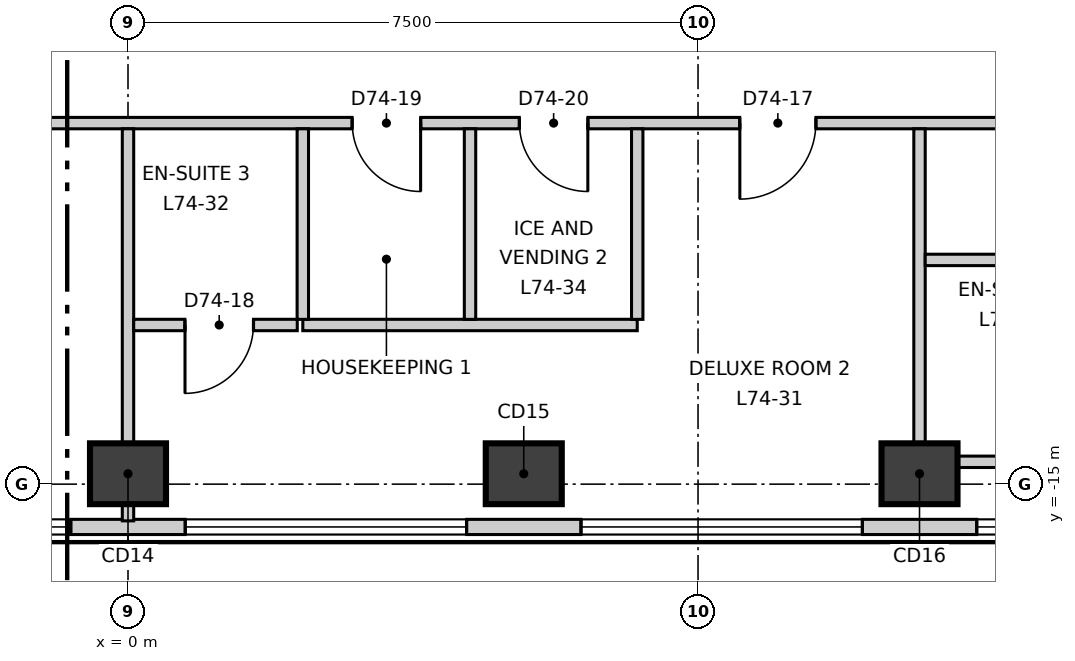
"""IFC4 building model, lengths in metres.
Left out: names, types, materials, properties, quantities, classifications, styles, units other than length and angle.
Written with IfcOpenShell. Run it as: python <this file> out.ifc"""

import sys

from ifc_helpers import new_model, si_unit, direction, frame, frame_2d, origin, origin_2d, place, context, subcontext, project, spatial, rectangle, extrude, element, fill, save


model = new_model("IFC4")
c1 = context("Model", 3, precision=1e-05, world=origin(), true_north=direction((0.0, 1.0)))
c2 = subcontext(c1, "Body", "Model", "MODEL_VIEW")
j1 = project(units=[si_unit("LENGTHUNIT", "METRE"), si_unit("PLANEANGLEUNIT", "RADIAN")], contexts=[c1])
p1 = place(None, origin())
s1 = spatial("IfcSite", under=j1, at=p1, CompositionType="ELEMENT")
p2 = place(p1, origin())
s2 = spatial("IfcBuilding", under=s1, at=p2, CompositionType="ELEMENT")
p3 = place(p2, frame((0.0, 0.0, 311.5)))
s3 = spatial("IfcBuildingStorey", under=s2, at=p3, CompositionType="ELEMENT", Elevation=311.5)
for number, where, z_axis, x_axis in (
    (1, (0.0, -14.863, -0.3), (0.0, 0.0, 1.0), (1.0, 0.0, 0.0)),
    (2, (5.207, -14.863, -0.3), (0.0, 0.0, 1.0), (1.0, 0.0, 0.0)),
    (3, (10.414, -14.863, -0.3), (0.0, 0.0, 1.0), (1.0, 0.0, 0.0)),
):
    element("IfcColumn", number, at=place(p3, frame(where, z_axis=z_axis, x_axis=x_axis)), inside=s3, PredefinedType="COLUMN", context=c2, shape_type="SweptSolid", body=[
        extrude(rectangle(XDim=1.0, YDim=0.8, at=origin_2d()), origin(), (0.0, 0.0, 1.0), 3.6),
    ])
p4 = place(p3, frame((-22.132, -15.563, 0.0), z_axis=(0.0, 0.0, 1.0), x_axis=(1.0, 0.0, 0.0)))
e4 = element("IfcWall", 4, at=p4, inside=s3, PredefinedType="ELEMENTEDWALL", context=c2, shape_type="SweptSolid", body=[
    extrude(rectangle(XDim=44.244, YDim=0.2, at=frame_2d((22.122, 0.0))), origin(), (0.0, 0.0, 1.0), 3.3),
])
p5 = place(p4, frame((2.057, 0.0, 0.9)))
e5 = element("IfcOpeningElement", 5, at=p5, cuts=e4, PredefinedType="OPENING", context=c2, shape_type="SweptSolid", body=[
    extrude(rectangle(XDim=3.7, YDim=2.2, at=frame_2d((1.85, 1.1))), frame((0.0, 0.11, 0.0), z_axis=(0.0, -1.0, 0.0), x_axis=(1.0, 0.0, 0.0)), (0.0, 0.0, 1.0), 0.22),
])
p6 = place(p4, frame((7.264, 0.0, 0.9)))
e6 = element("IfcOpeningElement", 6, at=p6, cuts=e4, PredefinedType="OPENING", context=c2, shape_type="SweptSolid", body=[
    extrude(rectangle(XDim=3.7, YDim=2.2, at=frame_2d((1.85, 1.1))), frame((0.0, 0.11, 0.0), z_axis=(0.0, -1.0, 0.0), x_axis=(1.0, 0.0, 0.0)), (0.0, 0.0, 1.0), 0.22),
])
p7 = place(p4, frame((12.471, 0.0, 0.9)))
e7 = element("IfcOpeningElement", 7, at=p7, cuts=e4, PredefinedType="OPENING", context=c2, shape_type="SweptSolid", body=[
    extrude(rectangle(XDim=3.7, YDim=2.2, at=frame_2d((1.85, 1.1))), frame((0.0, 0.11, 0.0), z_axis=(0.0, -1.0, 0.0), x_axis=(1.0, 0.0, 0.0)), (0.0, 0.0, 1.0), 0.22),
])
p8 = place(p4, frame((17.678, 0.0, 0.9)))
e8 = element("IfcOpeningElement", 8, at=p8, cuts=e4, PredefinedType="OPENING", context=c2, shape_type="SweptSolid", body=[
    extrude(rectangle(XDim=3.7, YDim=2.2, at=frame_2d((1.85, 1.1))), frame((0.0, 0.11, 0.0), z_axis=(0.0, -1.0, 0.0), x_axis=(1.0, 0.0, 0.0)), (0.0, 0.0, 1.0), 0.22),
])
p9 = place(p4, frame((22.886, 0.0, 0.9)))
e9 = element("IfcOpeningElement", 9, at=p9, cuts=e4, PredefinedType="OPENING", context=c2, shape_type="SweptSolid", body=[
    extrude(rectangle(XDim=3.7, YDim=2.2, at=frame_2d((1.85, 1.1))), frame((0.0, 0.11, 0.0), z_axis=(0.0, -1.0, 0.0), x_axis=(1.0, 0.0, 0.0)), (0.0, 0.0, 1.0), 0.22),
])
p10 = place(p4, frame((28.093, 0.0, 0.9)))
e10 = element("IfcOpeningElement", 10, at=p10, cuts=e4, PredefinedType="OPENING", context=c2, shape_type="SweptSolid", body=[
    extrude(rectangle(XDim=3.7, YDim=2.2, at=frame_2d((1.85, 1.1))), frame((0.0, 0.11, 0.0), z_axis=(0.0, -1.0, 0.0), x_axis=(1.0, 0.0, 0.0)), (0.0, 0.0, 1.0), 0.22),
])
p11 = place(p4, frame((33.3, 0.0, 0.9)))
e11 = element("IfcOpeningElement", 11, at=p11, cuts=e4, PredefinedType="OPENING", context=c2, shape_type="SweptSolid", body=[
    extrude(rectangle(XDim=3.7, YDim=2.2, at=frame_2d((1.85, 1.1))), frame((0.0, 0.11, 0.0), z_axis=(0.0, -1.0, 0.0), x_axis=(1.0, 0.0, 0.0)), (0.0, 0.0, 1.0), 0.22),
])
p12 = place(p4, frame((38.507, 0.0, 0.9)))
e12 = element("IfcOpeningElement", 12, at=p12, cuts=e4, PredefinedType="OPENING", context=c2, shape_type="SweptSolid", body=[
    extrude(rectangle(XDim=3.7, YDim=2.2, at=frame_2d((1.85, 1.1))), frame((0.0, 0.11, 0.0), z_axis=(0.0, -1.0, 0.0), x_axis=(1.0, 0.0, 0.0)), (0.0, 0.0, 1.0), 0.22),
])
p13 = place(p3, frame((24.544, -11.385, 0.0), z_axis=(0.0, 0.0, 1.0), x_axis=(-0.500002044679, 0.866024223285, 0.0)))
e13 = element("IfcWall", 13, at=p13, inside=s3, PredefinedType="ELEMENTEDWALL", context=c2, shape_type="SweptSolid", body=[
    extrude(rectangle(XDim=44.243, YDim=0.2, at=frame_2d((22.122, 0.0))), origin(), (0.0, 0.0, 1.0), 3.3),
])
p14 = place(p13, frame((2.056, 0.0, 0.9)))
e14 = element("IfcOpeningElement", 14, at=p14, cuts=e13, PredefinedType="OPENING", context=c2, shape_type="SweptSolid", body=[
    extrude(rectangle(XDim=3.7, YDim=2.2, at=frame_2d((1.85, 1.1))), frame((0.0, 0.11, 0.0), z_axis=(0.0, -1.0, 0.0), x_axis=(1.0, 0.0, 0.0)), (0.0, 0.0, 1.0), 0.22),
])
p15 = place(p13, frame((7.264, 0.0, 0.9)))
e15 = element("IfcOpeningElement", 15, at=p15, cuts=e13, PredefinedType="OPENING", context=c2, shape_type="SweptSolid", body=[
    extrude(rectangle(XDim=3.7, YDim=2.2, at=frame_2d((1.85, 1.1))), frame((0.0, 0.11, 0.0), z_axis=(0.0, -1.0, 0.0), x_axis=(1.0, 0.0, 0.0)), (0.0, 0.0, 1.0), 0.22),
])
p16 = place(p13, frame((12.471, 0.0, 0.9)))
e16 = element("IfcOpeningElement", 16, at=p16, cuts=e13, PredefinedType="OPENING", context=c2, shape_type="SweptSolid", body=[
    extrude(rectangle(XDim=3.7, YDim=2.2, at=frame_2d((1.85, 1.1))), frame((0.0, 0.11, 0.0), z_axis=(0.0, -1.0, 0.0), x_axis=(1.0, 0.0, 0.0)), (0.0, 0.0, 1.0), 0.22),
])
p17 = place(p13, frame((17.678, 0.0, 0.9)))
e17 = element("IfcOpeningElement", 17, at=p17, cuts=e13, PredefinedType="OPENING", context=c2, shape_type="SweptSolid", body=[
    extrude(rectangle(XDim=3.7, YDim=2.2, at=frame_2d((1.85, 1.1))), frame((0.0, 0.11, 0.0), z_axis=(0.0, -1.0, 0.0), x_axis=(1.0, 0.0, 0.0)), (0.0, 0.0, 1.0), 0.22),
])
p18 = place(p13, frame((22.885, 0.0, 0.9)))
e18 = element("IfcOpeningElement", 18, at=p18, cuts=e13, PredefinedType="OPENING", context=c2, shape_type="SweptSolid", body=[
    extrude(rectangle(XDim=3.7, YDim=2.2, at=frame_2d((1.85, 1.1))), frame((0.0, 0.11, 0.0), z_axis=(0.0, -1.0, 0.0), x_axis=(1.0, 0.0, 0.0)), (0.0, 0.0, 1.0), 0.22),
])
p19 = place(p13, frame((28.093, 0.0, 0.9)))
e19 = element("IfcOpeningElement", 19, at=p19, cuts=e13, PredefinedType="OPENING", context=c2, shape_type="SweptSolid", body=[
    extrude(rectangle(XDim=3.7, YDim=2.2, at=frame_2d((1.85, 1.1))), frame((0.0, 0.11, 0.0), z_axis=(0.0, -1.0, 0.0), x_axis=(1.0, 0.0, 0.0)), (0.0, 0.0, 1.0), 0.22),
])
p20 = place(p13, frame((33.3, 0.0, 0.9)))
e20 = element("IfcOpeningElement", 20, at=p20, cuts=e13, PredefinedType="OPENING", context=c2, shape_type="SweptSolid", body=[
    extrude(rectangle(XDim=3.7, YDim=2.2, at=frame_2d((1.85, 1.1))), frame((0.0, 0.11, 0.0), z_axis=(0.0, -1.0, 0.0), x_axis=(1.0, 0.0, 0.0)), (0.0, 0.0, 1.0), 0.22),
])
p21 = place(p13, frame((38.507, 0.0, 0.9)))
e21 = element("IfcOpeningElement", 21, at=p21, cuts=e13, PredefinedType="OPENING", context=c2, shape_type="SweptSolid", body=[
    extrude(rectangle(XDim=3.7, YDim=2.2, at=frame_2d((1.85, 1.1))), frame((0.0, 0.11, 0.0), z_axis=(0.0, -1.0, 0.0), x_axis=(1.0, 0.0, 0.0)), (0.0, 0.0, 1.0), 0.22),
])
p22 = place(p3, frame((-17.678, -10.12, 0.0), z_axis=(0.0, 0.0, 1.0), x_axis=(0.49998824015, 0.86603219323, 0.0)))
e22 = element("IfcWall", 22, at=p22, inside=s3, PredefinedType="PARTITIONING", context=c2, shape_type="SweptSolid", body=[
    extrude(rectangle(XDim=35.357, YDim=0.15, at=frame_2d((17.678, 0.0))), origin(), (0.0, 0.0, 1.0), 3.3),
])
p23 = place(p22, frame((28.607, 0.0, 0.0)))
e23 = element("IfcOpeningElement", 23, at=p23, cuts=e22, PredefinedType="OPENING", context=c2, shape_type="SweptSolid", body=[
    extrude(rectangle(XDim=1.0, YDim=2.1, at=frame_2d((0.5, 1.05))), frame((0.0, 0.085, 0.0), z_axis=(0.0, -1.0, 0.0), x_axis=(1.0, 0.0, 0.0)), (0.0, 0.0, 1.0), 0.17),
])
p24 = place(p22, frame((13.86, 0.0, 0.0)))
e24 = element("IfcOpeningElement", 24, at=p24, cuts=e22, PredefinedType="OPENING", context=c2, shape_type="SweptSolid", body=[
    extrude(rectangle(XDim=1.0, YDim=2.1, at=frame_2d((0.5, 1.05))), frame((0.0, 0.085, 0.0), z_axis=(0.0, -1.0, 0.0), x_axis=(1.0, 0.0, 0.0)), (0.0, 0.0, 1.0), 0.17),
])
p25 = place(p22, frame((18.96, 0.0, 0.0)))
e25 = element("IfcOpeningElement", 25, at=p25, cuts=e22, PredefinedType="OPENING", context=c2, shape_type="SweptSolid", body=[
    extrude(rectangle(XDim=0.9, YDim=2.1, at=frame_2d((0.45, 1.05))), frame((0.0, 0.085, 0.0), z_axis=(0.0, -1.0, 0.0), x_axis=(1.0, 0.0, 0.0)), (0.0, 0.0, 1.0), 0.17),
])
p26 = place(p22, frame((16.86, 0.0, 0.0)))
e26 = element("IfcOpeningElement", 26, at=p26, cuts=e22, PredefinedType="OPENING", context=c2, shape_type="SweptSolid", body=[
    extrude(rectangle(XDim=0.9, YDim=2.1, at=frame_2d((0.45, 1.05))), frame((0.0, 0.085, 0.0), z_axis=(0.0, -1.0, 0.0), x_axis=(1.0, 0.0, 0.0)), (0.0, 0.0, 1.0), 0.17),
])
p27 = place(p22, frame((8.146, 0.0, 0.0)))
e27 = element("IfcOpeningElement", 27, at=p27, cuts=e22, PredefinedType="OPENING", context=c2, shape_type="SweptSolid", body=[
    extrude(rectangle(XDim=1.0, YDim=2.1, at=frame_2d((0.5, 1.05))), frame((0.0, 0.085, 0.0), z_axis=(0.0, -1.0, 0.0), x_axis=(1.0, 0.0, 0.0)), (0.0, 0.0, 1.0), 0.17),
])
p28 = place(p22, frame((3.038, 0.0, 0.0)))
e28 = element("IfcOpeningElement", 28, at=p28, cuts=e22, PredefinedType="OPENING", context=c2, shape_type="SweptSolid", body=[
    extrude(rectangle(XDim=1.0, YDim=2.1, at=frame_2d((0.5, 1.05))), frame((0.0, 0.085, 0.0), z_axis=(0.0, -1.0, 0.0), x_axis=(1.0, 0.0, 0.0)), (0.0, 0.0, 1.0), 0.17),
])
p29 = place(p3, frame((-17.604, -10.25, 0.0), z_axis=(0.0, 0.0, 1.0), x_axis=(1.0, 0.0, 0.0)))
e29 = element("IfcWall", 29, at=p29, inside=s3, PredefinedType="PARTITIONING", context=c2, shape_type="SweptSolid", body=[
    extrude(rectangle(XDim=35.358, YDim=0.15, at=frame_2d((17.679, 0.0))), origin(), (0.0, 0.0, 1.0), 3.3),
])
p30 = place(p29, frame((3.0, 0.0, 0.0)))
e30 = element("IfcOpeningElement", 30, at=p30, cuts=e29, PredefinedType="OPENING", context=c2, shape_type="SweptSolid", body=[
    extrude(rectangle(XDim=1.0, YDim=2.1, at=frame_2d((0.5, 1.05))), frame((0.0, 0.085, 0.0), z_axis=(0.0, -1.0, 0.0), x_axis=(1.0, 0.0, 0.0)), (0.0, 0.0, 1.0), 0.17),
])
p31 = place(p29, frame((15.14, 0.0, 0.0)))
e31 = element("IfcOpeningElement", 31, at=p31, cuts=e29, PredefinedType="OPENING", context=c2, shape_type="SweptSolid", body=[
    extrude(rectangle(XDim=1.0, YDim=2.1, at=frame_2d((0.5, 1.05))), frame((0.0, 0.085, 0.0), z_axis=(0.0, -1.0, 0.0), x_axis=(1.0, 0.0, 0.0)), (0.0, 0.0, 1.0), 0.17),
])
p32 = place(p29, frame((10.14, 0.0, 0.0)))
e32 = element("IfcOpeningElement", 32, at=p32, cuts=e29, PredefinedType="OPENING", context=c2, shape_type="SweptSolid", body=[
    extrude(rectangle(XDim=0.9, YDim=2.1, at=frame_2d((0.45, 1.05))), frame((0.0, 0.085, 0.0), z_axis=(0.0, -1.0, 0.0), x_axis=(1.0, 0.0, 0.0)), (0.0, 0.0, 1.0), 0.17),
])
p33 = place(p29, frame((12.24, 0.0, 0.0)))
e33 = element("IfcOpeningElement", 33, at=p33, cuts=e29, PredefinedType="OPENING", context=c2, shape_type="SweptSolid", body=[
    extrude(rectangle(XDim=0.9, YDim=2.1, at=frame_2d((0.45, 1.05))), frame((0.0, 0.085, 0.0), z_axis=(0.0, -1.0, 0.0), x_axis=(1.0, 0.0, 0.0)), (0.0, 0.0, 1.0), 0.17),
])
p34 = place(p29, frame((25.654, 0.0, 0.0)))
e34 = element("IfcOpeningElement", 34, at=p34, cuts=e29, PredefinedType="OPENING", context=c2, shape_type="SweptSolid", body=[
    extrude(rectangle(XDim=1.0, YDim=2.1, at=frame_2d((0.5, 1.05))), frame((0.0, 0.085, 0.0), z_axis=(0.0, -1.0, 0.0), x_axis=(1.0, 0.0, 0.0)), (0.0, 0.0, 1.0), 0.17),
])
p35 = place(p29, frame((20.554, 0.0, 0.0)))
e35 = element("IfcOpeningElement", 35, at=p35, cuts=e29, PredefinedType="OPENING", context=c2, shape_type="SweptSolid", body=[
    extrude(rectangle(XDim=0.9, YDim=2.1, at=frame_2d((0.45, 1.05))), frame((0.0, 0.085, 0.0), z_axis=(0.0, -1.0, 0.0), x_axis=(1.0, 0.0, 0.0)), (0.0, 0.0, 1.0), 0.17),
])
p36 = place(p29, frame((22.754, 0.0, 0.0)))
e36 = element("IfcOpeningElement", 36, at=p36, cuts=e29, PredefinedType="OPENING", context=c2, shape_type="SweptSolid", body=[
    extrude(rectangle(XDim=0.9, YDim=2.1, at=frame_2d((0.45, 1.05))), frame((0.0, 0.085, 0.0), z_axis=(0.0, -1.0, 0.0), x_axis=(1.0, 0.0, 0.0)), (0.0, 0.0, 1.0), 0.17),
])
p37 = place(p29, frame((31.168, 0.0, 0.0)))
e37 = element("IfcOpeningElement", 37, at=p37, cuts=e29, PredefinedType="OPENING", context=c2, shape_type="SweptSolid", body=[
    extrude(rectangle(XDim=1.0, YDim=2.1, at=frame_2d((0.5, 1.05))), frame((0.0, 0.085, 0.0), z_axis=(0.0, -1.0, 0.0), x_axis=(1.0, 0.0, 0.0)), (0.0, 0.0, 1.0), 0.17),
])
p38 = place(p3, frame((2.3, -12.906, 0.0), z_axis=(0.0, 0.0, 1.0), x_axis=(1.0, 0.0, 0.0)))
e38 = element("IfcWall", 38, at=p38, inside=s3, PredefinedType="PARTITIONING", context=c2, shape_type="SweptSolid", body=[
    extrude(rectangle(XDim=4.4, YDim=0.15, at=frame_2d((2.2, 0.0))), origin(), (0.0, 0.0, 1.0), 3.3),
])
p39 = place(p3, frame((0.0, -15.483, 0.0), z_axis=(0.0, 0.0, 1.0), x_axis=(0.0, 1.0, 0.0)))
e39 = element("IfcWall", 39, at=p39, inside=s3, PredefinedType="PARTITIONING", context=c2, shape_type="SweptSolid", body=[
    extrude(rectangle(XDim=5.158, YDim=0.15, at=frame_2d((2.579, 0.0))), origin(), (0.0, 0.0, 1.0), 2.8),
])
p40 = place(p3, frame((0.075, 20.37, 0.0), z_axis=(0.0, 0.0, 1.0), x_axis=(0.500006672087, -0.866021551619, 0.0)))
e40 = element("IfcWall", 40, at=p40, inside=s3, PredefinedType="PARTITIONING", context=c2, shape_type="SweptSolid", body=[
    extrude(rectangle(XDim=35.27, YDim=0.15, at=frame_2d((17.635, 0.0))), origin(), (0.0, 0.0, 1.0), 3.3),
])
p41 = place(p40, frame((31.206, 0.0, 0.0)))
e41 = element("IfcOpeningElement", 41, at=p41, cuts=e40, PredefinedType="OPENING", context=c2, shape_type="SweptSolid", body=[
    extrude(rectangle(XDim=1.0, YDim=2.1, at=frame_2d((0.5, 1.05))), frame((0.0, 0.085, 0.0), z_axis=(0.0, -1.0, 0.0), x_axis=(1.0, 0.0, 0.0)), (0.0, 0.0, 1.0), 0.17),
])
p42 = place(p40, frame((19.968, 0.0, 0.0)))
e42 = element("IfcOpeningElement", 42, at=p42, cuts=e40, PredefinedType="OPENING", context=c2, shape_type="SweptSolid", body=[
    extrude(rectangle(XDim=1.0, YDim=2.1, at=frame_2d((0.5, 1.05))), frame((0.0, 0.085, 0.0), z_axis=(0.0, -1.0, 0.0), x_axis=(1.0, 0.0, 0.0)), (0.0, 0.0, 1.0), 0.17),
])
p43 = place(p40, frame((13.353, 0.0, 0.0)))
e43 = element("IfcOpeningElement", 43, at=p43, cuts=e40, PredefinedType="OPENING", context=c2, shape_type="SweptSolid", body=[
    extrude(rectangle(XDim=1.0, YDim=2.1, at=frame_2d((0.5, 1.05))), frame((0.0, 0.085, 0.0), z_axis=(0.0, -1.0, 0.0), x_axis=(1.0, 0.0, 0.0)), (0.0, 0.0, 1.0), 0.17),
])
p44 = place(p40, frame((7.746, 0.0, 0.0)))
e44 = element("IfcOpeningElement", 44, at=p44, cuts=e40, PredefinedType="OPENING", context=c2, shape_type="SweptSolid", body=[
    extrude(rectangle(XDim=1.0, YDim=2.1, at=frame_2d((0.5, 1.05))), frame((0.0, 0.085, 0.0), z_axis=(0.0, -1.0, 0.0), x_axis=(1.0, 0.0, 0.0)), (0.0, 0.0, 1.0), 0.17),
])
p45 = place(p40, frame((3.038, 0.0, 0.0)))
e45 = element("IfcOpeningElement", 45, at=p45, cuts=e40, PredefinedType="OPENING", context=c2, shape_type="SweptSolid", body=[
    extrude(rectangle(XDim=1.0, YDim=2.1, at=frame_2d((0.5, 1.05))), frame((0.0, 0.085, 0.0), z_axis=(0.0, -1.0, 0.0), x_axis=(1.0, 0.0, 0.0)), (0.0, 0.0, 1.0), 0.17),
])
for number, where, z_axis, x_axis in (
    (46, (2.3, -12.832, 0.0), (0.0, 0.0, 1.0), (0.0, 1.0, 0.0)),
    (47, (6.7, -12.832, 0.0), (0.0, 0.0, 1.0), (0.0, 1.0, 0.0)),
    (48, (4.5, -12.832, 0.0), (0.0, 0.0, 1.0), (0.0, 1.0, 0.0)),
):
    element("IfcWall", number, at=place(p3, frame(where, z_axis=z_axis, x_axis=x_axis)), inside=s3, PredefinedType="PARTITIONING", context=c2, shape_type="SweptSolid", body=[
        extrude(rectangle(XDim=2.507, YDim=0.15, at=frame_2d((1.253, 0.0))), origin(), (0.0, 0.0, 1.0), 3.3),
    ])
p46 = place(p3, frame((10.414, -14.858, 0.0), z_axis=(0.0, 0.0, 1.0), x_axis=(0.0, 1.0, 0.0)))
e49 = element("IfcWall", 49, at=p46, inside=s3, PredefinedType="PARTITIONING", context=c2, shape_type="SweptSolid", body=[
    extrude(rectangle(XDim=4.533, YDim=0.15, at=frame_2d((2.267, 0.0))), origin(), (0.0, 0.0, 1.0), 3.1),
])
p47 = place(p3, frame((10.489, -12.05, 0.0), z_axis=(0.0, 0.0, 1.0), x_axis=(1.0, 0.0, 0.0)))
e50 = element("IfcWall", 50, at=p47, inside=s3, PredefinedType="PARTITIONING", context=c2, shape_type="SweptSolid", body=[
    extrude(rectangle(XDim=2.525, YDim=0.15, at=frame_2d((1.262, 0.0))), origin(), (0.0, 0.0, 1.0), 3.3),
])
p48 = place(p3, frame((10.489, -14.706, 0.0), z_axis=(0.0, 0.0, 1.0), x_axis=(1.0, 0.0, 0.0)))
e51 = element("IfcWall", 51, at=p48, inside=s3, PredefinedType="PARTITIONING", context=c2, shape_type="SweptSolid", body=[
    extrude(rectangle(XDim=2.525, YDim=0.15, at=frame_2d((1.262, 0.0))), origin(), (0.0, 0.0, 1.0), 2.6),
])
p49 = place(p3, frame((0.075, -12.906, 0.0), z_axis=(0.0, 0.0, 1.0), x_axis=(1.0, 0.0, 0.0)))
e52 = element("IfcWall", 52, at=p49, inside=s3, PredefinedType="PARTITIONING", context=c2, shape_type="SweptSolid", body=[
    extrude(rectangle(XDim=2.152, YDim=0.15, at=frame_2d((1.076, 0.0))), origin(), (0.0, 0.0, 1.0), 3.3),
])
p50 = place(p49, frame((0.675, 0.0, 0.0)))
e53 = element("IfcOpeningElement", 53, at=p50, cuts=e52, PredefinedType="OPENING", context=c2, shape_type="SweptSolid", body=[
    extrude(rectangle(XDim=0.9, YDim=2.1, at=frame_2d((0.45, 1.05))), frame((0.0, 0.085, 0.0), z_axis=(0.0, -1.0, 0.0), x_axis=(1.0, 0.0, 0.0)), (0.0, 0.0, 1.0), 0.17),
])
p51 = place(p8, origin())
e54 = element("IfcWindow", 54, at=p51, inside=s3, PartitioningType="SINGLE_PANEL", PredefinedType="WINDOW", context=c2, shape_type="SweptSolid", body=[
    extrude(rectangle(XDim=3.7, YDim=2.2, at=frame_2d((1.85, 1.1))), frame((0.0, 0.03, 0.0), z_axis=(0.0, -1.0, 0.0), x_axis=(1.0, 0.0, 0.0)), (0.0, 0.0, 1.0), 0.06),
])
fill(e8, e54)
p52 = place(p9, origin())
e55 = element("IfcWindow", 55, at=p52, inside=s3, PartitioningType="SINGLE_PANEL", PredefinedType="WINDOW", context=c2, shape_type="SweptSolid", body=[
    extrude(rectangle(XDim=3.7, YDim=2.2, at=frame_2d((1.85, 1.1))), frame((0.0, 0.03, 0.0), z_axis=(0.0, -1.0, 0.0), x_axis=(1.0, 0.0, 0.0)), (0.0, 0.0, 1.0), 0.06),
])
fill(e9, e55)
p53 = place(p10, origin())
e56 = element("IfcWindow", 56, at=p53, inside=s3, PartitioningType="SINGLE_PANEL", PredefinedType="WINDOW", context=c2, shape_type="SweptSolid", body=[
    extrude(rectangle(XDim=3.7, YDim=2.2, at=frame_2d((1.85, 1.1))), frame((0.0, 0.03, 0.0), z_axis=(0.0, -1.0, 0.0), x_axis=(1.0, 0.0, 0.0)), (0.0, 0.0, 1.0), 0.06),
])
fill(e10, e56)
p54 = place(p11, origin())
e57 = element("IfcWindow", 57, at=p54, inside=s3, PartitioningType="SINGLE_PANEL", PredefinedType="WINDOW", context=c2, shape_type="SweptSolid", body=[
    extrude(rectangle(XDim=3.7, YDim=2.2, at=frame_2d((1.85, 1.1))), frame((0.0, 0.03, 0.0), z_axis=(0.0, -1.0, 0.0), x_axis=(1.0, 0.0, 0.0)), (0.0, 0.0, 1.0), 0.06),
])
fill(e11, e57)
p55 = place(p34, origin())
e58 = element("IfcDoor", 58, at=p55, inside=s3, OperationType="SINGLE_SWING_LEFT", PredefinedType="DOOR", context=c2, shape_type="SweptSolid", body=[
    extrude(rectangle(XDim=1.0, YDim=2.1, at=frame_2d((0.5, 1.05))), frame((0.0, 0.025, 0.0), z_axis=(0.0, -1.0, 0.0), x_axis=(1.0, 0.0, 0.0)), (0.0, 0.0, 1.0), 0.05),
])
fill(e34, e58)
p56 = place(p50, origin())
e59 = element("IfcDoor", 59, at=p56, inside=s3, OperationType="SINGLE_SWING_LEFT", PredefinedType="DOOR", context=c2, shape_type="SweptSolid", body=[
    extrude(rectangle(XDim=0.9, YDim=2.1, at=frame_2d((0.45, 1.05))), frame((0.0, 0.025, 0.0), z_axis=(0.0, -1.0, 0.0), x_axis=(1.0, 0.0, 0.0)), (0.0, 0.0, 1.0), 0.05),
])
fill(e53, e59)
p57 = place(p35, origin())
e60 = element("IfcDoor", 60, at=p57, inside=s3, OperationType="SINGLE_SWING_RIGHT", PredefinedType="DOOR", context=c2, shape_type="SweptSolid", body=[
    extrude(rectangle(XDim=0.9, YDim=2.1, at=frame_2d((0.45, 1.05))), frame((0.0, 0.025, 0.0), z_axis=(0.0, -1.0, 0.0), x_axis=(1.0, 0.0, 0.0)), (0.0, 0.0, 1.0), 0.05),
])
fill(e35, e60)
p58 = place(p36, origin())
e61 = element("IfcDoor", 61, at=p58, inside=s3, OperationType="SINGLE_SWING_RIGHT", PredefinedType="DOOR", context=c2, shape_type="SweptSolid", body=[
    extrude(rectangle(XDim=0.9, YDim=2.1, at=frame_2d((0.45, 1.05))), frame((0.0, 0.025, 0.0), z_axis=(0.0, -1.0, 0.0), x_axis=(1.0, 0.0, 0.0)), (0.0, 0.0, 1.0), 0.05),
])
fill(e36, e61)
save(model, sys.argv[1])
